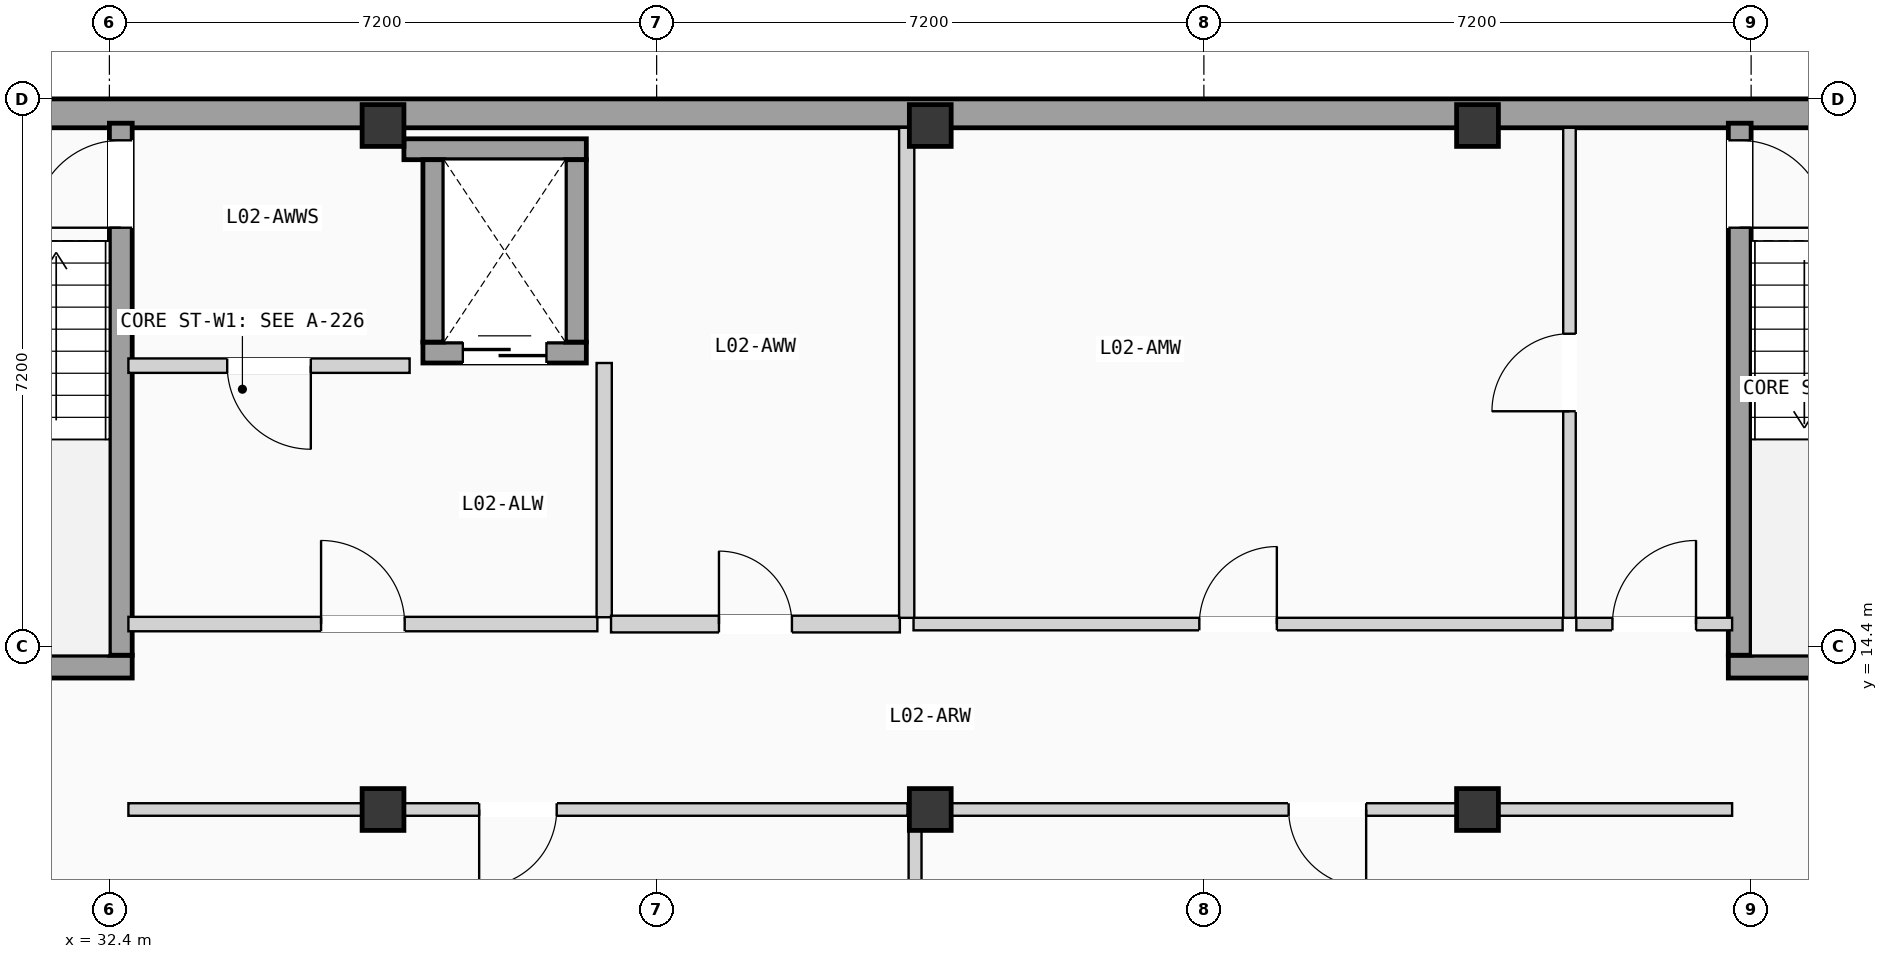
"""IFC4 building model, lengths in metres.
Left out: names, types, materials, properties, quantities, classifications, styles, units other than length and angle.
Written with IfcOpenShell. Run it as: python <this file> out.ifc"""

import sys

from ifc_helpers import new_model, si_unit, direction, frame, frame_2d, origin, origin_2d, place, context, subcontext, project, spatial, rectangle, extrude, element, fill, save


model = new_model("IFC4")
c1 = context("Model", 3, precision=1e-05, world=origin(), true_north=direction((0.0, 1.0)))
c2 = subcontext(c1, "Body", "Model", "MODEL_VIEW")
j1 = project(units=[si_unit("LENGTHUNIT", "METRE"), si_unit("PLANEANGLEUNIT", "RADIAN")], contexts=[c1])
p1 = place(None, origin())
s1 = spatial("IfcSite", under=j1, at=p1, CompositionType="ELEMENT")
p2 = place(p1, origin())
s2 = spatial("IfcBuilding", under=s1, at=p2, CompositionType="ELEMENT")
p3 = place(p2, frame((0.0, 0.0, 8.575)))
s3 = spatial("IfcBuildingStorey", under=s2, at=p3, CompositionType="ELEMENT", Elevation=8.575)
for number, where, z_axis, x_axis in (
    (1, (36.0, 12.25, 0.0), (0.0, 0.0, 1.0), (1.0, 0.0, 0.0)),
    (2, (36.0, 21.25, 0.0), (0.0, 0.0, 1.0), (1.0, 0.0, 0.0)),
    (3, (43.2, 12.25, 0.0), (0.0, 0.0, 1.0), (1.0, 0.0, 0.0)),
    (4, (43.2, 21.25, 0.0), (0.0, 0.0, 1.0), (1.0, 0.0, 0.0)),
    (5, (50.4, 12.25, 0.0), (0.0, 0.0, 1.0), (1.0, 0.0, 0.0)),
    (6, (50.4, 21.25, 0.0), (0.0, 0.0, 1.0), (1.0, 0.0, 0.0)),
):
    element("IfcColumn", number, at=place(p3, frame(where, z_axis=z_axis, x_axis=x_axis)), inside=s3, PredefinedType="COLUMN", context=c2, shape_type="SweptSolid", body=[
        extrude(rectangle(XDim=0.55, YDim=0.55, at=origin_2d()), origin(), (0.0, 0.0, 1.0), 3.5),
    ])
p4 = place(p3, frame((28.8, 21.41, 0.0), z_axis=(0.0, 0.0, 1.0), x_axis=(1.0, 0.0, 0.0)))
e7 = element("IfcWall", 7, at=p4, inside=s3, PredefinedType="SOLIDWALL", context=c2, shape_type="SweptSolid", body=[
    extrude(rectangle(XDim=28.8, YDim=0.38, at=frame_2d((14.4, 0.0))), origin(), (0.0, 0.0, 1.0), 3.26),
])
p5 = place(p3, frame((29.1, 14.13, 0.0), z_axis=(0.0, 0.0, 1.0), x_axis=(1.0, 0.0, 0.0)))
e8 = element("IfcWall", 8, at=p5, inside=s3, PredefinedType="SHEAR", context=c2, shape_type="SweptSolid", body=[
    extrude(rectangle(XDim=3.6, YDim=0.3, at=frame_2d((1.8, 0.0))), origin(), (0.0, 0.0, 1.0), 3.26),
])
p6 = place(p3, frame((32.55, 14.28, 0.0), z_axis=(0.0, 0.0, 1.0), x_axis=(0.0, 1.0, 0.0)))
e9 = element("IfcWall", 9, at=p6, inside=s3, PredefinedType="SHEAR", context=c2, shape_type="SweptSolid", body=[
    extrude(rectangle(XDim=7.0, YDim=0.3, at=frame_2d((3.5, 0.0))), origin(), (0.0, 0.0, 1.0), 3.26),
])
p7 = place(p6, frame((5.625, 0.0, 0.0)))
e10 = element("IfcOpeningElement", 10, at=p7, cuts=e9, PredefinedType="OPENING", context=c2, shape_type="SweptSolid", body=[
    extrude(rectangle(XDim=1.15, YDim=2.12, at=frame_2d((0.575, 1.06))), frame((0.0, 0.16, 0.0), z_axis=(0.0, -1.0, 0.0), x_axis=(1.0, 0.0, 0.0)), (0.0, 0.0, 1.0), 0.32),
])
p8 = place(p3, frame((53.7, 14.13, 0.0), z_axis=(0.0, 0.0, 1.0), x_axis=(1.0, 0.0, 0.0)))
e11 = element("IfcWall", 11, at=p8, inside=s3, PredefinedType="SHEAR", context=c2, shape_type="SweptSolid", body=[
    extrude(rectangle(XDim=3.6, YDim=0.3, at=frame_2d((1.8, 0.0))), origin(), (0.0, 0.0, 1.0), 3.26),
])
p9 = place(p3, frame((53.85, 14.28, 0.0), z_axis=(0.0, 0.0, 1.0), x_axis=(0.0, 1.0, 0.0)))
e12 = element("IfcWall", 12, at=p9, inside=s3, PredefinedType="SHEAR", context=c2, shape_type="SweptSolid", body=[
    extrude(rectangle(XDim=7.0, YDim=0.3, at=frame_2d((3.5, 0.0))), origin(), (0.0, 0.0, 1.0), 3.26),
])
p10 = place(p9, frame((5.625, 0.0, 0.0)))
e13 = element("IfcOpeningElement", 13, at=p10, cuts=e12, PredefinedType="OPENING", context=c2, shape_type="SweptSolid", body=[
    extrude(rectangle(XDim=1.15, YDim=2.12, at=frame_2d((0.575, 1.06))), frame((0.0, 0.16, 0.0), z_axis=(0.0, -1.0, 0.0), x_axis=(1.0, 0.0, 0.0)), (0.0, 0.0, 1.0), 0.32),
])
p11 = place(p3, frame((36.525, 18.262, 0.0), z_axis=(0.0, 0.0, 1.0), x_axis=(1.0, 0.0, 0.0)))
e14 = element("IfcWall", 14, at=p11, inside=s3, PredefinedType="SHEAR", context=c2, shape_type="SweptSolid", body=[
    extrude(rectangle(XDim=2.15, YDim=0.275, at=frame_2d((1.075, 0.0))), origin(), (0.0, 0.0, 1.0), 3.26),
])
p12 = place(p11, frame((0.525, 0.0, 0.0)))
e15 = element("IfcOpeningElement", 15, at=p12, cuts=e14, PredefinedType="OPENING", context=c2, shape_type="SweptSolid", body=[
    extrude(rectangle(XDim=1.1, YDim=2.15, at=frame_2d((0.55, 1.075))), frame((0.0, 0.147, 0.0), z_axis=(0.0, -1.0, 0.0), x_axis=(1.0, 0.0, 0.0)), (0.0, 0.0, 1.0), 0.295),
])
for number, where, z_axis, x_axis in (
    (16, (36.275, 20.938, 0.0), (0.0, 0.0, 1.0), (1.0, 0.0, 0.0)),
    (17, (36.663, 18.4, 0.0), (0.0, 0.0, 1.0), (0.0, 1.0, 0.0)),
    (18, (38.538, 18.4, 0.0), (0.0, 0.0, 1.0), (0.0, 1.0, 0.0)),
):
    element("IfcWall", number, at=place(p3, frame(where, z_axis=z_axis, x_axis=x_axis)), inside=s3, PredefinedType="SHEAR", context=c2, shape_type="SweptSolid", body=[
        extrude(rectangle(XDim=2.4, YDim=0.275, at=frame_2d((1.2, 0.0))), origin(), (0.0, 0.0, 1.0), 3.26),
    ])
p13 = place(p3, frame((32.65, 18.09, 0.0), z_axis=(0.0, 0.0, 1.0), x_axis=(1.0, 0.0, 0.0)))
e19 = element("IfcWall", 19, at=p13, inside=s3, PredefinedType="PARTITIONING", context=c2, shape_type="SweptSolid", body=[
    extrude(rectangle(XDim=3.7, YDim=0.19, at=frame_2d((1.85, 0.0))), origin(), (0.0, 0.0, 1.0), 3.22),
])
p14 = place(p13, frame((1.3, 0.0, 0.0)))
e20 = element("IfcOpeningElement", 20, at=p14, cuts=e19, PredefinedType="OPENING", context=c2, shape_type="SweptSolid", body=[
    extrude(rectangle(XDim=1.1, YDim=2.12, at=frame_2d((0.55, 1.06))), frame((0.0, 0.105, 0.0), z_axis=(0.0, -1.0, 0.0), x_axis=(1.0, 0.0, 0.0)), (0.0, 0.0, 1.0), 0.21),
])
p15 = place(p3, frame((32.65, 14.69, 0.0), z_axis=(0.0, 0.0, 1.0), x_axis=(1.0, 0.0, 0.0)))
e21 = element("IfcWall", 21, at=p15, inside=s3, PredefinedType="PARTITIONING", context=c2, shape_type="SweptSolid", body=[
    extrude(rectangle(XDim=6.17, YDim=0.19, at=frame_2d((3.085, 0.0))), origin(), (0.0, 0.0, 1.0), 3.22),
])
p16 = place(p15, frame((2.535, 0.0, 0.0)))
e22 = element("IfcOpeningElement", 22, at=p16, cuts=e21, PredefinedType="OPENING", context=c2, shape_type="SweptSolid", body=[
    extrude(rectangle(XDim=1.1, YDim=2.12, at=frame_2d((0.55, 1.06))), frame((0.0, 0.105, 0.0), z_axis=(0.0, -1.0, 0.0), x_axis=(1.0, 0.0, 0.0)), (0.0, 0.0, 1.0), 0.21),
])
p17 = place(p3, frame((38.91, 14.78, 0.0), z_axis=(0.0, 0.0, 1.0), x_axis=(0.0, 1.0, 0.0)))
e23 = element("IfcWall", 23, at=p17, inside=s3, PredefinedType="PLUMBINGWALL", context=c2, shape_type="SweptSolid", body=[
    extrude(rectangle(XDim=3.345, YDim=0.2, at=frame_2d((1.672, 0.0))), origin(), (0.0, 0.0, 1.0), 3.22),
])
p18 = place(p3, frame((51.7, 14.69, 0.0), z_axis=(0.0, 0.0, 1.0), x_axis=(1.0, 0.0, 0.0)))
e24 = element("IfcWall", 24, at=p18, inside=s3, PredefinedType="PARTITIONING", context=c2, shape_type="SweptSolid", body=[
    extrude(rectangle(XDim=2.05, YDim=0.165, at=frame_2d((1.025, 0.0))), origin(), (0.0, 0.0, 1.0), 3.22),
])
p19 = place(p18, frame((0.475, 0.0, 0.0)))
e25 = element("IfcOpeningElement", 25, at=p19, cuts=e24, PredefinedType="OPENING", context=c2, shape_type="SweptSolid", body=[
    extrude(rectangle(XDim=1.1, YDim=2.12, at=frame_2d((0.55, 1.06))), frame((0.0, 0.093, 0.0), z_axis=(0.0, -1.0, 0.0), x_axis=(1.0, 0.0, 0.0)), (0.0, 0.0, 1.0), 0.185),
])
p20 = place(p3, frame((32.65, 12.25, 0.0), z_axis=(0.0, 0.0, 1.0), x_axis=(1.0, 0.0, 0.0)))
e26 = element("IfcWall", 26, at=p20, inside=s3, PredefinedType="PARTITIONING", context=c2, shape_type="SweptSolid", body=[
    extrude(rectangle(XDim=10.25, YDim=0.165, at=frame_2d((5.125, 0.0))), origin(), (0.0, 0.0, 1.0), 2.58),
])
p21 = place(p20, frame((4.615, 0.0, 0.0)))
e27 = element("IfcOpeningElement", 27, at=p21, cuts=e26, PredefinedType="OPENING", context=c2, shape_type="SweptSolid", body=[
    extrude(rectangle(XDim=1.02, YDim=2.16, at=frame_2d((0.51, 1.08))), frame((0.0, 0.093, 0.0), z_axis=(0.0, -1.0, 0.0), x_axis=(1.0, 0.0, 0.0)), (0.0, 0.0, 1.0), 0.185),
])
p22 = place(p3, frame((43.1, 12.25, 0.0), z_axis=(0.0, 0.0, 1.0), x_axis=(1.0, 0.0, 0.0)))
e28 = element("IfcWall", 28, at=p22, inside=s3, PredefinedType="PARTITIONING", context=c2, shape_type="SweptSolid", body=[
    extrude(rectangle(XDim=10.65, YDim=0.165, at=frame_2d((5.325, 0.0))), origin(), (0.0, 0.0, 1.0), 2.58),
])
p23 = place(p22, frame((4.815, 0.0, 0.0)))
e29 = element("IfcOpeningElement", 29, at=p23, cuts=e28, PredefinedType="OPENING", context=c2, shape_type="SweptSolid", body=[
    extrude(rectangle(XDim=1.02, YDim=2.16, at=frame_2d((0.51, 1.08))), frame((0.0, 0.093, 0.0), z_axis=(0.0, -1.0, 0.0), x_axis=(1.0, 0.0, 0.0)), (0.0, 0.0, 1.0), 0.185),
])
p24 = place(p3, frame((39.0, 14.69, 0.0), z_axis=(0.0, 0.0, 1.0), x_axis=(1.0, 0.0, 0.0)))
e30 = element("IfcWall", 30, at=p24, inside=s3, PredefinedType="PLUMBINGWALL", context=c2, shape_type="SweptSolid", body=[
    extrude(rectangle(XDim=3.8, YDim=0.22, at=frame_2d((1.9, 0.0))), origin(), (0.0, 0.0, 1.0), 3.22),
])
p25 = place(p24, frame((1.42, 0.0, 0.0)))
e31 = element("IfcOpeningElement", 31, at=p25, cuts=e30, PredefinedType="OPENING", context=c2, shape_type="SweptSolid", body=[
    extrude(rectangle(XDim=0.96, YDim=2.05, at=frame_2d((0.48, 1.025))), frame((0.0, 0.12, 0.0), z_axis=(0.0, -1.0, 0.0), x_axis=(1.0, 0.0, 0.0)), (0.0, 0.0, 1.0), 0.24),
])
p26 = place(p3, frame((42.98, 14.69, 0.0), z_axis=(0.0, 0.0, 1.0), x_axis=(1.0, 0.0, 0.0)))
e32 = element("IfcWall", 32, at=p26, inside=s3, PredefinedType="PARTITIONING", context=c2, shape_type="SweptSolid", body=[
    extrude(rectangle(XDim=8.54, YDim=0.165, at=frame_2d((4.27, 0.0))), origin(), (0.0, 0.0, 1.0), 3.22),
])
p27 = place(p26, frame((3.76, 0.0, 0.0)))
e33 = element("IfcOpeningElement", 33, at=p27, cuts=e32, PredefinedType="OPENING", context=c2, shape_type="SweptSolid", body=[
    extrude(rectangle(XDim=1.02, YDim=2.16, at=frame_2d((0.51, 1.08))), frame((0.0, 0.093, 0.0), z_axis=(0.0, -1.0, 0.0), x_axis=(1.0, 0.0, 0.0)), (0.0, 0.0, 1.0), 0.185),
])
p28 = place(p3, frame((51.61, 14.772, 0.0), z_axis=(0.0, 0.0, 1.0), x_axis=(0.0, 1.0, 0.0)))
e34 = element("IfcWall", 34, at=p28, inside=s3, PredefinedType="PARTITIONING", context=c2, shape_type="SweptSolid", body=[
    extrude(rectangle(XDim=6.448, YDim=0.165, at=frame_2d((3.224, 0.0))), origin(), (0.0, 0.0, 1.0), 3.22),
])
p29 = place(p28, frame((2.718, 0.0, 0.0)))
e35 = element("IfcOpeningElement", 35, at=p29, cuts=e34, PredefinedType="OPENING", context=c2, shape_type="SweptSolid", body=[
    extrude(rectangle(XDim=1.02, YDim=2.16, at=frame_2d((0.51, 1.08))), frame((0.0, 0.093, 0.0), z_axis=(0.0, -1.0, 0.0), x_axis=(1.0, 0.0, 0.0)), (0.0, 0.0, 1.0), 0.185),
])
p30 = place(p3, frame((43.0, 0.38, 0.0), z_axis=(0.0, 0.0, 1.0), x_axis=(0.0, 1.0, 0.0)))
e36 = element("IfcWall", 36, at=p30, inside=s3, PredefinedType="PARTITIONING", context=c2, shape_type="SweptSolid", body=[
    extrude(rectangle(XDim=11.788, YDim=0.17, at=frame_2d((5.894, 0.0))), origin(), (0.0, 0.0, 1.0), 2.63),
])
p31 = place(p3, frame((42.89, 14.772, 0.0), z_axis=(0.0, 0.0, 1.0), x_axis=(0.0, 1.0, 0.0)))
e37 = element("IfcWall", 37, at=p31, inside=s3, PredefinedType="PLUMBINGWALL", context=c2, shape_type="SweptSolid", body=[
    extrude(rectangle(XDim=6.448, YDim=0.2, at=frame_2d((3.224, 0.0))), origin(), (0.0, 0.0, 1.0), 2.63),
])
p32 = place(p7, origin())
e38 = element("IfcDoor", 38, at=p32, inside=s3, OperationType="SINGLE_SWING_LEFT", PredefinedType="DOOR", context=c2, shape_type="SweptSolid", body=[
    extrude(rectangle(XDim=1.15, YDim=2.12, at=frame_2d((0.575, 1.06))), frame((0.0, 0.025, 0.0), z_axis=(0.0, -1.0, 0.0), x_axis=(1.0, 0.0, 0.0)), (0.0, 0.0, 1.0), 0.05),
])
fill(e10, e38)
p33 = place(p10, frame((1.15, 0.0, 0.0), z_axis=(0.0, 0.0, 1.0), x_axis=(-1.0, 0.0, 0.0)))
e39 = element("IfcDoor", 39, at=p33, inside=s3, OperationType="SINGLE_SWING_LEFT", PredefinedType="DOOR", context=c2, shape_type="SweptSolid", body=[
    extrude(rectangle(XDim=1.15, YDim=2.12, at=frame_2d((0.575, 1.06))), frame((0.0, 0.025, 0.0), z_axis=(0.0, -1.0, 0.0), x_axis=(1.0, 0.0, 0.0)), (0.0, 0.0, 1.0), 0.05),
])
fill(e13, e39)
p34 = place(p12, origin())
e40 = element("IfcDoor", 40, at=p34, inside=s3, OperationType="SLIDING_TO_LEFT", PredefinedType="DOOR", context=c2, shape_type="SweptSolid", body=[
    extrude(rectangle(XDim=1.1, YDim=2.15, at=frame_2d((0.55, 1.075))), frame((0.0, 0.025, 0.0), z_axis=(0.0, -1.0, 0.0), x_axis=(1.0, 0.0, 0.0)), (0.0, 0.0, 1.0), 0.05),
])
fill(e15, e40)
p35 = place(p14, frame((1.1, 0.0, 0.0), z_axis=(0.0, 0.0, 1.0), x_axis=(-1.0, 0.0, 0.0)))
e41 = element("IfcDoor", 41, at=p35, inside=s3, OperationType="SINGLE_SWING_RIGHT", PredefinedType="DOOR", context=c2, shape_type="SweptSolid", body=[
    extrude(rectangle(XDim=1.1, YDim=2.12, at=frame_2d((0.55, 1.06))), frame((0.0, 0.025, 0.0), z_axis=(0.0, -1.0, 0.0), x_axis=(1.0, 0.0, 0.0)), (0.0, 0.0, 1.0), 0.05),
])
fill(e20, e41)
p36 = place(p16, origin())
e42 = element("IfcDoor", 42, at=p36, inside=s3, OperationType="SINGLE_SWING_LEFT", PredefinedType="DOOR", context=c2, shape_type="SweptSolid", body=[
    extrude(rectangle(XDim=1.1, YDim=2.12, at=frame_2d((0.55, 1.06))), frame((0.0, 0.025, 0.0), z_axis=(0.0, -1.0, 0.0), x_axis=(1.0, 0.0, 0.0)), (0.0, 0.0, 1.0), 0.05),
])
fill(e22, e42)
p37 = place(p19, origin())
e43 = element("IfcDoor", 43, at=p37, inside=s3, OperationType="SINGLE_SWING_RIGHT", PredefinedType="DOOR", context=c2, shape_type="SweptSolid", body=[
    extrude(rectangle(XDim=1.1, YDim=2.12, at=frame_2d((0.55, 1.06))), frame((0.0, 0.025, 0.0), z_axis=(0.0, -1.0, 0.0), x_axis=(1.0, 0.0, 0.0)), (0.0, 0.0, 1.0), 0.05),
])
fill(e25, e43)
p38 = place(p21, frame((1.02, 0.0, 0.0), z_axis=(0.0, 0.0, 1.0), x_axis=(-1.0, 0.0, 0.0)))
e44 = element("IfcDoor", 44, at=p38, inside=s3, OperationType="SINGLE_SWING_LEFT", PredefinedType="DOOR", context=c2, shape_type="SweptSolid", body=[
    extrude(rectangle(XDim=1.02, YDim=2.16, at=frame_2d((0.51, 1.08))), frame((0.0, 0.025, 0.0), z_axis=(0.0, -1.0, 0.0), x_axis=(1.0, 0.0, 0.0)), (0.0, 0.0, 1.0), 0.05),
])
fill(e27, e44)
p39 = place(p23, frame((1.02, 0.0, 0.0), z_axis=(0.0, 0.0, 1.0), x_axis=(-1.0, 0.0, 0.0)))
e45 = element("IfcDoor", 45, at=p39, inside=s3, OperationType="SINGLE_SWING_RIGHT", PredefinedType="DOOR", context=c2, shape_type="SweptSolid", body=[
    extrude(rectangle(XDim=1.02, YDim=2.16, at=frame_2d((0.51, 1.08))), frame((0.0, 0.025, 0.0), z_axis=(0.0, -1.0, 0.0), x_axis=(1.0, 0.0, 0.0)), (0.0, 0.0, 1.0), 0.05),
])
fill(e29, e45)
p40 = place(p25, origin())
e46 = element("IfcDoor", 46, at=p40, inside=s3, OperationType="SINGLE_SWING_LEFT", PredefinedType="DOOR", context=c2, shape_type="SweptSolid", body=[
    extrude(rectangle(XDim=0.96, YDim=2.05, at=frame_2d((0.48, 1.025))), frame((0.0, 0.025, 0.0), z_axis=(0.0, -1.0, 0.0), x_axis=(1.0, 0.0, 0.0)), (0.0, 0.0, 1.0), 0.05),
])
fill(e31, e46)
p41 = place(p27, origin())
e47 = element("IfcDoor", 47, at=p41, inside=s3, OperationType="SINGLE_SWING_RIGHT", PredefinedType="DOOR", context=c2, shape_type="SweptSolid", body=[
    extrude(rectangle(XDim=1.02, YDim=2.16, at=frame_2d((0.51, 1.08))), frame((0.0, 0.025, 0.0), z_axis=(0.0, -1.0, 0.0), x_axis=(1.0, 0.0, 0.0)), (0.0, 0.0, 1.0), 0.05),
])
fill(e33, e47)
p42 = place(p29, origin())
e48 = element("IfcDoor", 48, at=p42, inside=s3, OperationType="SINGLE_SWING_LEFT", PredefinedType="DOOR", context=c2, shape_type="SweptSolid", body=[
    extrude(rectangle(XDim=1.02, YDim=2.16, at=frame_2d((0.51, 1.08))), frame((0.0, 0.025, 0.0), z_axis=(0.0, -1.0, 0.0), x_axis=(1.0, 0.0, 0.0)), (0.0, 0.0, 1.0), 0.05),
])
fill(e35, e48)
save(model, sys.argv[1])
